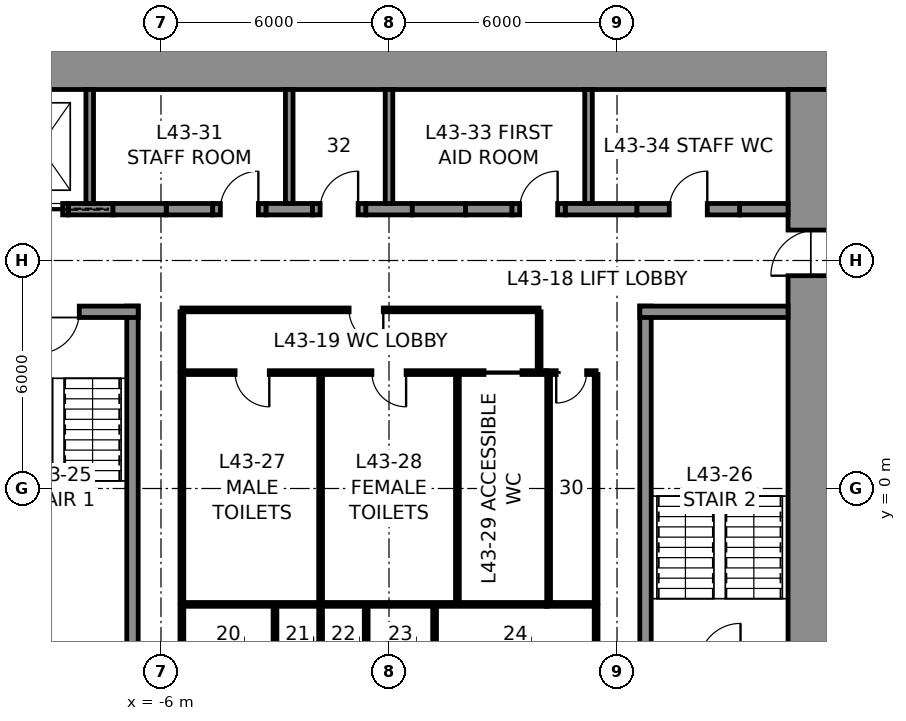
"""IFC4 building model, lengths in metres.
Left out: names, types, materials, properties, quantities, classifications, styles, units other than length and angle.
Written with IfcOpenShell. Run it as: python <this file> out.ifc"""

import sys

from ifc_helpers import new_model, si_unit, direction, frame, frame_2d, origin, place, context, subcontext, project, spatial, rectangle, extrude, element, fill, save


model = new_model("IFC4")
c1 = context("Model", 3, precision=1e-05, world=origin(), true_north=direction((0.0, 1.0)))
c2 = subcontext(c1, "Body", "Model", "MODEL_VIEW")
j1 = project(units=[si_unit("LENGTHUNIT", "METRE"), si_unit("PLANEANGLEUNIT", "RADIAN")], contexts=[c1])
p1 = place(None, origin())
s1 = spatial("IfcSite", under=j1, at=p1, CompositionType="ELEMENT")
p2 = place(p1, origin())
s2 = spatial("IfcBuilding", under=s1, at=p2, CompositionType="ELEMENT")
p3 = place(p2, frame((0.0, 0.0, 201.8)))
s3 = spatial("IfcBuildingStorey", under=s2, at=p3, CompositionType="ELEMENT", Elevation=201.8)
p4 = place(p3, frame((-12.0, 11.25, 0.0), z_axis=(0.0, 0.0, 1.0), x_axis=(1.0, 0.0, 0.0)))
e1 = element("IfcWall", 1, at=p4, inside=s3, PredefinedType="SHEAR", context=c2, shape_type="SweptSolid", body=[
    extrude(rectangle(XDim=24.0, YDim=1.5, at=frame_2d((12.0, 0.0))), origin(), (0.0, 0.0, 1.0), 4.0),
])
p5 = place(p3, frame((11.25, 10.5, 0.0), z_axis=(0.0, 0.0, 1.0), x_axis=(0.0, -1.0, 0.0)))
e2 = element("IfcWall", 2, at=p5, inside=s3, PredefinedType="SHEAR", context=c2, shape_type="SweptSolid", body=[
    extrude(rectangle(XDim=21.0, YDim=1.5, at=frame_2d((10.5, 0.0))), origin(), (0.0, 0.0, 1.0), 4.0),
])
p6 = place(p5, frame((3.7, 0.0, 0.0)))
e3 = element("IfcOpeningElement", 3, at=p6, cuts=e2, PredefinedType="OPENING", context=c2, shape_type="SweptSolid", body=[
    extrude(rectangle(XDim=1.2, YDim=2.3, at=frame_2d((0.6, 1.15))), frame((0.0, 0.76, 0.0), z_axis=(0.0, -1.0, 0.0), x_axis=(1.0, 0.0, 0.0)), (0.0, 0.0, 1.0), 1.52),
])
p7 = place(p5, frame((16.1, 0.0, 0.0)))
e4 = element("IfcOpeningElement", 4, at=p7, cuts=e2, PredefinedType="OPENING", context=c2, shape_type="SweptSolid", body=[
    extrude(rectangle(XDim=1.2, YDim=2.3, at=frame_2d((0.6, 1.15))), frame((0.0, 0.76, 0.0), z_axis=(0.0, -1.0, 0.0), x_axis=(1.0, 0.0, 0.0)), (0.0, 0.0, 1.0), 1.52),
])
p8 = place(p3, frame((-8.438, 7.35, 0.0), z_axis=(0.0, 0.0, 1.0), x_axis=(1.0, 0.0, 0.0)))
e5 = element("IfcWall", 5, at=p8, inside=s3, PredefinedType="SHEAR", context=c2, shape_type="SweptSolid", body=[
    extrude(rectangle(XDim=1.175, YDim=0.3, at=frame_2d((0.587, 0.0))), origin(), (0.0, 0.0, 1.0), 4.0),
])
for number, where, z_axis, x_axis in (
    (6, (-5.863, 7.35, 0.0), (0.0, 0.0, 1.0), (1.0, 0.0, 0.0)),
    (7, (-3.238, 7.35, 0.0), (0.0, 0.0, 1.0), (1.0, 0.0, 0.0)),
    (8, (-0.613, 7.35, 0.0), (0.0, 0.0, 1.0), (1.0, 0.0, 0.0)),
    (9, (2.012, 7.35, 0.0), (0.0, 0.0, 1.0), (1.0, 0.0, 0.0)),
):
    element("IfcWall", number, at=place(p3, frame(where, z_axis=z_axis, x_axis=x_axis)), inside=s3, PredefinedType="SHEAR", context=c2, shape_type="SweptSolid", body=[
        extrude(rectangle(XDim=1.225, YDim=0.3, at=frame_2d((0.613, 0.0))), origin(), (0.0, 0.0, 1.0), 4.0),
    ])
p9 = place(p3, frame((4.637, 7.35, 0.0), z_axis=(0.0, 0.0, 1.0), x_axis=(1.0, 0.0, 0.0)))
e10 = element("IfcWall", 10, at=p9, inside=s3, PredefinedType="SHEAR", context=c2, shape_type="SweptSolid", body=[
    extrude(rectangle(XDim=1.887, YDim=0.3, at=frame_2d((0.944, 0.0))), origin(), (0.0, 0.0, 1.0), 4.0),
])
p10 = place(p3, frame((9.225, 7.35, 0.0), z_axis=(0.0, 0.0, 1.0), x_axis=(1.0, 0.0, 0.0)))
e11 = element("IfcWall", 11, at=p10, inside=s3, PredefinedType="SHEAR", context=c2, shape_type="SweptSolid", body=[
    extrude(rectangle(XDim=1.275, YDim=0.3, at=frame_2d((0.637, 0.0))), origin(), (0.0, 0.0, 1.0), 4.0),
])
p11 = place(p3, frame((-9.938, 7.35, 0.0), z_axis=(0.0, 0.0, 1.0), x_axis=(1.0, 0.0, 0.0)))
e12 = element("IfcWall", 12, at=p11, inside=s3, PredefinedType="PARTITIONING", context=c2, shape_type="SweptSolid", body=[
    extrude(rectangle(XDim=1.5, YDim=0.3, at=frame_2d((0.75, 0.0))), origin(), (0.0, 0.0, 1.0), 4.0),
])
p12 = place(p11, frame((0.15, 0.0, 0.0)))
e13 = element("IfcOpeningElement", 13, at=p12, cuts=e12, PredefinedType="OPENING", context=c2, shape_type="SweptSolid", body=[
    extrude(rectangle(XDim=1.2, YDim=2.3, at=frame_2d((0.6, 1.15))), frame((0.0, 0.16, 0.0), z_axis=(0.0, -1.0, 0.0), x_axis=(1.0, 0.0, 0.0)), (0.0, 0.0, 1.0), 0.32),
])
p13 = place(p3, frame((-7.262, 7.35, 0.0), z_axis=(0.0, 0.0, 1.0), x_axis=(1.0, 0.0, 0.0)))
e14 = element("IfcWall", 14, at=p13, inside=s3, PredefinedType="PARTITIONING", context=c2, shape_type="SweptSolid", body=[
    extrude(rectangle(XDim=1.4, YDim=0.3, at=frame_2d((0.7, 0.0))), origin(), (0.0, 0.0, 1.0), 4.0),
])
p14 = place(p3, frame((-4.637, 7.35, 0.0), z_axis=(0.0, 0.0, 1.0), x_axis=(1.0, 0.0, 0.0)))
e15 = element("IfcWall", 15, at=p14, inside=s3, PredefinedType="PARTITIONING", context=c2, shape_type="SweptSolid", body=[
    extrude(rectangle(XDim=1.4, YDim=0.3, at=frame_2d((0.7, 0.0))), origin(), (0.0, 0.0, 1.0), 4.0),
])
p15 = place(p14, frame((0.2, 0.0, 0.0)))
e16 = element("IfcOpeningElement", 16, at=p15, cuts=e15, PredefinedType="OPENING", context=c2, shape_type="SweptSolid", body=[
    extrude(rectangle(XDim=1.0, YDim=2.3, at=frame_2d((0.5, 1.15))), frame((0.0, 0.16, 0.0), z_axis=(0.0, -1.0, 0.0), x_axis=(1.0, 0.0, 0.0)), (0.0, 0.0, 1.0), 0.32),
])
p16 = place(p3, frame((-2.012, 7.35, 0.0), z_axis=(0.0, 0.0, 1.0), x_axis=(1.0, 0.0, 0.0)))
e17 = element("IfcWall", 17, at=p16, inside=s3, PredefinedType="PARTITIONING", context=c2, shape_type="SweptSolid", body=[
    extrude(rectangle(XDim=1.4, YDim=0.3, at=frame_2d((0.7, 0.0))), origin(), (0.0, 0.0, 1.0), 4.0),
])
p17 = place(p16, frame((0.2, 0.0, 0.0)))
e18 = element("IfcOpeningElement", 18, at=p17, cuts=e17, PredefinedType="OPENING", context=c2, shape_type="SweptSolid", body=[
    extrude(rectangle(XDim=1.0, YDim=2.3, at=frame_2d((0.5, 1.15))), frame((0.0, 0.16, 0.0), z_axis=(0.0, -1.0, 0.0), x_axis=(1.0, 0.0, 0.0)), (0.0, 0.0, 1.0), 0.32),
])
p18 = place(p3, frame((0.613, 7.35, 0.0), z_axis=(0.0, 0.0, 1.0), x_axis=(1.0, 0.0, 0.0)))
e19 = element("IfcWall", 19, at=p18, inside=s3, PredefinedType="PARTITIONING", context=c2, shape_type="SweptSolid", body=[
    extrude(rectangle(XDim=1.4, YDim=0.3, at=frame_2d((0.7, 0.0))), origin(), (0.0, 0.0, 1.0), 4.0),
])
p19 = place(p3, frame((3.238, 7.35, 0.0), z_axis=(0.0, 0.0, 1.0), x_axis=(1.0, 0.0, 0.0)))
e20 = element("IfcWall", 20, at=p19, inside=s3, PredefinedType="PARTITIONING", context=c2, shape_type="SweptSolid", body=[
    extrude(rectangle(XDim=1.4, YDim=0.3, at=frame_2d((0.7, 0.0))), origin(), (0.0, 0.0, 1.0), 4.0),
])
p20 = place(p19, frame((0.2, 0.0, 0.0)))
e21 = element("IfcOpeningElement", 21, at=p20, cuts=e20, PredefinedType="OPENING", context=c2, shape_type="SweptSolid", body=[
    extrude(rectangle(XDim=1.0, YDim=2.3, at=frame_2d((0.5, 1.15))), frame((0.0, 0.16, 0.0), z_axis=(0.0, -1.0, 0.0), x_axis=(1.0, 0.0, 0.0)), (0.0, 0.0, 1.0), 0.32),
])
p21 = place(p3, frame((6.525, 7.35, 0.0), z_axis=(0.0, 0.0, 1.0), x_axis=(1.0, 0.0, 0.0)))
e22 = element("IfcWall", 22, at=p21, inside=s3, PredefinedType="PARTITIONING", context=c2, shape_type="SweptSolid", body=[
    extrude(rectangle(XDim=2.7, YDim=0.3, at=frame_2d((1.35, 0.0))), origin(), (0.0, 0.0, 1.0), 4.0),
])
p22 = place(p21, frame((0.85, 0.0, 0.0)))
e23 = element("IfcOpeningElement", 23, at=p22, cuts=e22, PredefinedType="OPENING", context=c2, shape_type="SweptSolid", body=[
    extrude(rectangle(XDim=1.0, YDim=2.3, at=frame_2d((0.5, 1.15))), frame((0.0, 0.16, 0.0), z_axis=(0.0, -1.0, 0.0), x_axis=(1.0, 0.0, 0.0)), (0.0, 0.0, 1.0), 0.32),
])
for number, where, z_axis, x_axis in (
    (24, (-7.875, 7.5, 0.0), (0.0, 0.0, 1.0), (0.0, 1.0, 0.0)),
    (25, (-2.625, 7.5, 0.0), (0.0, 0.0, 1.0), (0.0, 1.0, 0.0)),
    (26, (0.0, 7.5, 0.0), (0.0, 0.0, 1.0), (0.0, 1.0, 0.0)),
    (27, (5.25, 7.5, 0.0), (0.0, 0.0, 1.0), (0.0, 1.0, 0.0)),
):
    element("IfcWall", number, at=place(p3, frame(where, z_axis=z_axis, x_axis=x_axis)), inside=s3, PredefinedType="PARTITIONING", context=c2, shape_type="SweptSolid", body=[
        extrude(rectangle(XDim=3.0, YDim=0.2, at=frame_2d((1.5, 0.0))), origin(), (0.0, 0.0, 1.0), 4.0),
    ])
p23 = place(p3, frame((-6.75, -4.8, 0.0), z_axis=(0.0, 0.0, 1.0), x_axis=(0.0, 1.0, 0.0)))
e28 = element("IfcWall", 28, at=p23, inside=s3, PredefinedType="SOLIDWALL", context=c2, shape_type="SweptSolid", body=[
    extrude(rectangle(XDim=9.6, YDim=0.3, at=frame_2d((4.8, 0.0))), origin(), (0.0, 0.0, 1.0), 3.75),
])
p24 = place(p3, frame((-10.5, 4.65, 0.0), z_axis=(0.0, 0.0, 1.0), x_axis=(1.0, 0.0, 0.0)))
e29 = element("IfcWall", 29, at=p24, inside=s3, PredefinedType="SOLIDWALL", context=c2, shape_type="SweptSolid", body=[
    extrude(rectangle(XDim=3.9, YDim=0.3, at=frame_2d((1.95, 0.0))), origin(), (0.0, 0.0, 1.0), 3.75),
])
p25 = place(p24, frame((1.25, 0.0, 0.0)))
e30 = element("IfcOpeningElement", 30, at=p25, cuts=e29, PredefinedType="OPENING", context=c2, shape_type="SweptSolid", body=[
    extrude(rectangle(XDim=1.1, YDim=2.3, at=frame_2d((0.55, 1.15))), frame((0.0, 0.16, 0.0), z_axis=(0.0, -1.0, 0.0), x_axis=(1.0, 0.0, 0.0)), (0.0, 0.0, 1.0), 0.32),
])
p26 = place(p3, frame((6.75, -4.8, 0.0), z_axis=(0.0, 0.0, 1.0), x_axis=(0.0, 1.0, 0.0)))
e31 = element("IfcWall", 31, at=p26, inside=s3, PredefinedType="SOLIDWALL", context=c2, shape_type="SweptSolid", body=[
    extrude(rectangle(XDim=9.6, YDim=0.3, at=frame_2d((4.8, 0.0))), origin(), (0.0, 0.0, 1.0), 3.75),
])
p27 = place(p3, frame((6.6, 4.65, 0.0), z_axis=(0.0, 0.0, 1.0), x_axis=(1.0, 0.0, 0.0)))
e32 = element("IfcWall", 32, at=p27, inside=s3, PredefinedType="SOLIDWALL", context=c2, shape_type="SweptSolid", body=[
    extrude(rectangle(XDim=3.9, YDim=0.3, at=frame_2d((1.95, 0.0))), origin(), (0.0, 0.0, 1.0), 3.75),
])
p28 = place(p3, frame((-5.45, 3.05, 0.0), z_axis=(0.0, 0.0, 1.0), x_axis=(1.0, 0.0, 0.0)))
e33 = element("IfcWall", 33, at=p28, inside=s3, PredefinedType="PARTITIONING", context=c2, shape_type="SweptSolid", body=[
    extrude(rectangle(XDim=9.6, YDim=0.1, at=frame_2d((4.8, 0.0))), origin(), (0.0, 0.0, 1.0), 3.75),
])
p29 = place(p28, frame((1.4, 0.0, 0.0)))
e34 = element("IfcOpeningElement", 34, at=p29, cuts=e33, PredefinedType="OPENING", context=c2, shape_type="SweptSolid", body=[
    extrude(rectangle(XDim=0.9, YDim=2.3, at=frame_2d((0.45, 1.15))), frame((0.0, 0.06, 0.0), z_axis=(0.0, -1.0, 0.0), x_axis=(1.0, 0.0, 0.0)), (0.0, 0.0, 1.0), 0.12),
])
p30 = place(p28, frame((5.0, 0.0, 0.0)))
e35 = element("IfcOpeningElement", 35, at=p30, cuts=e33, PredefinedType="OPENING", context=c2, shape_type="SweptSolid", body=[
    extrude(rectangle(XDim=0.9, YDim=2.3, at=frame_2d((0.45, 1.15))), frame((0.0, 0.06, 0.0), z_axis=(0.0, -1.0, 0.0), x_axis=(1.0, 0.0, 0.0)), (0.0, 0.0, 1.0), 0.12),
])
p31 = place(p28, frame((7.95, 0.0, 0.0)))
e36 = element("IfcOpeningElement", 36, at=p31, cuts=e33, PredefinedType="OPENING", context=c2, shape_type="SweptSolid", body=[
    extrude(rectangle(XDim=1.0, YDim=2.3, at=frame_2d((0.5, 1.15))), frame((0.0, 0.06, 0.0), z_axis=(0.0, -1.0, 0.0), x_axis=(1.0, 0.0, 0.0)), (0.0, 0.0, 1.0), 0.12),
])
p32 = place(p3, frame((4.15, 3.05, 0.0), z_axis=(0.0, 0.0, 1.0), x_axis=(1.0, 0.0, 0.0)))
e37 = element("IfcWall", 37, at=p32, inside=s3, PredefinedType="PARTITIONING", context=c2, shape_type="SweptSolid", body=[
    extrude(rectangle(XDim=1.3, YDim=0.1, at=frame_2d((0.65, 0.0))), origin(), (0.0, 0.0, 1.0), 3.75),
])
p33 = place(p32, frame((0.25, 0.0, 0.0)))
e38 = element("IfcOpeningElement", 38, at=p33, cuts=e37, PredefinedType="OPENING", context=c2, shape_type="SweptSolid", body=[
    extrude(rectangle(XDim=0.8, YDim=2.3, at=frame_2d((0.4, 1.15))), frame((0.0, 0.06, 0.0), z_axis=(0.0, -1.0, 0.0), x_axis=(1.0, 0.0, 0.0)), (0.0, 0.0, 1.0), 0.12),
])
p34 = place(p3, frame((4.15, -3.05, 0.0), z_axis=(0.0, 0.0, 1.0), x_axis=(-1.0, 0.0, 0.0)))
e39 = element("IfcWall", 39, at=p34, inside=s3, PredefinedType="PARTITIONING", context=c2, shape_type="SweptSolid", body=[
    extrude(rectangle(XDim=9.6, YDim=0.1, at=frame_2d((4.8, 0.0))), origin(), (0.0, 0.0, 1.0), 3.75),
])
p35 = place(p3, frame((5.45, -3.05, 0.0), z_axis=(0.0, 0.0, 1.0), x_axis=(-1.0, 0.0, 0.0)))
e40 = element("IfcWall", 40, at=p35, inside=s3, PredefinedType="PARTITIONING", context=c2, shape_type="SweptSolid", body=[
    extrude(rectangle(XDim=1.3, YDim=0.1, at=frame_2d((0.65, 0.0))), origin(), (0.0, 0.0, 1.0), 3.75),
])
for number, where, z_axis, x_axis in (
    (41, (5.45, 3.0, 0.0), (0.0, 0.0, 1.0), (0.0, -1.0, 0.0)),
    (42, (-5.45, -3.0, 0.0), (0.0, 0.0, 1.0), (0.0, 1.0, 0.0)),
    (43, (-1.8, -3.0, 0.0), (0.0, 0.0, 1.0), (0.0, 1.0, 0.0)),
    (44, (1.8, -3.0, 0.0), (0.0, 0.0, 1.0), (0.0, 1.0, 0.0)),
    (45, (4.2, -3.0, 0.0), (0.0, 0.0, 1.0), (0.0, 1.0, 0.0)),
):
    element("IfcWall", number, at=place(p3, frame(where, z_axis=z_axis, x_axis=x_axis)), inside=s3, PredefinedType="PARTITIONING", context=c2, shape_type="SweptSolid", body=[
        extrude(rectangle(XDim=6.0, YDim=0.1, at=frame_2d((3.0, 0.0))), origin(), (0.0, 0.0, 1.0), 3.75),
    ])
p36 = place(p3, frame((-5.45, 4.7, 0.0), z_axis=(0.0, 0.0, 1.0), x_axis=(1.0, 0.0, 0.0)))
e46 = element("IfcWall", 46, at=p36, inside=s3, PredefinedType="PARTITIONING", context=c2, shape_type="SweptSolid", body=[
    extrude(rectangle(XDim=9.4, YDim=0.1, at=frame_2d((4.7, 0.0))), origin(), (0.0, 0.0, 1.0), 3.75),
])
p37 = place(p36, frame((4.4, 0.0, 0.0)))
e47 = element("IfcOpeningElement", 47, at=p37, cuts=e46, PredefinedType="OPENING", context=c2, shape_type="SweptSolid", body=[
    extrude(rectangle(XDim=0.9, YDim=2.3, at=frame_2d((0.45, 1.15))), frame((0.0, 0.06, 0.0), z_axis=(0.0, -1.0, 0.0), x_axis=(1.0, 0.0, 0.0)), (0.0, 0.0, 1.0), 0.12),
])
for number, where, z_axis, x_axis in (
    (48, (-5.45, 3.1, 0.0), (0.0, 0.0, 1.0), (0.0, 1.0, 0.0)),
    (49, (3.95, 3.1, 0.0), (0.0, 0.0, 1.0), (0.0, 1.0, 0.0)),
    (50, (-5.45, -3.1, 0.0), (0.0, 0.0, 1.0), (0.0, -1.0, 0.0)),
    (51, (5.45, -3.1, 0.0), (0.0, 0.0, 1.0), (0.0, -1.0, 0.0)),
    (52, (-3.0, -3.1, 0.0), (0.0, 0.0, 1.0), (0.0, -1.0, 0.0)),
    (53, (-1.8, -3.1, 0.0), (0.0, 0.0, 1.0), (0.0, -1.0, 0.0)),
    (54, (-0.6, -3.1, 0.0), (0.0, 0.0, 1.0), (0.0, -1.0, 0.0)),
    (55, (1.2, -3.1, 0.0), (0.0, 0.0, 1.0), (0.0, -1.0, 0.0)),
):
    element("IfcWall", number, at=place(p3, frame(where, z_axis=z_axis, x_axis=x_axis)), inside=s3, PredefinedType="PARTITIONING", context=c2, shape_type="SweptSolid", body=[
        extrude(rectangle(XDim=1.55, YDim=0.1, at=frame_2d((0.775, 0.0))), origin(), (0.0, 0.0, 1.0), 3.75),
    ])
p38 = place(p25, frame((1.1, 0.0, 0.0), z_axis=(0.0, 0.0, 1.0), x_axis=(-1.0, 0.0, 0.0)))
e56 = element("IfcDoor", 56, at=p38, inside=s3, OperationType="SINGLE_SWING_RIGHT", PredefinedType="DOOR", context=c2, shape_type="SweptSolid", body=[
    extrude(rectangle(XDim=1.1, YDim=2.3, at=frame_2d((0.55, 1.15))), frame((0.0, 0.025, 0.0), z_axis=(0.0, -1.0, 0.0), x_axis=(1.0, 0.0, 0.0)), (0.0, 0.0, 1.0), 0.05),
])
fill(e30, e56)
p39 = place(p29, frame((0.9, 0.0, 0.0), z_axis=(0.0, 0.0, 1.0), x_axis=(-1.0, 0.0, 0.0)))
e57 = element("IfcDoor", 57, at=p39, inside=s3, OperationType="SINGLE_SWING_LEFT", PredefinedType="DOOR", context=c2, shape_type="SweptSolid", body=[
    extrude(rectangle(XDim=0.9, YDim=2.3, at=frame_2d((0.45, 1.15))), frame((0.0, 0.025, 0.0), z_axis=(0.0, -1.0, 0.0), x_axis=(1.0, 0.0, 0.0)), (0.0, 0.0, 1.0), 0.05),
])
fill(e34, e57)
p40 = place(p30, frame((0.9, 0.0, 0.0), z_axis=(0.0, 0.0, 1.0), x_axis=(-1.0, 0.0, 0.0)))
e58 = element("IfcDoor", 58, at=p40, inside=s3, OperationType="SINGLE_SWING_LEFT", PredefinedType="DOOR", context=c2, shape_type="SweptSolid", body=[
    extrude(rectangle(XDim=0.9, YDim=2.3, at=frame_2d((0.45, 1.15))), frame((0.0, 0.025, 0.0), z_axis=(0.0, -1.0, 0.0), x_axis=(1.0, 0.0, 0.0)), (0.0, 0.0, 1.0), 0.05),
])
fill(e35, e58)
p41 = place(p31, frame((1.0, 0.0, 0.0), z_axis=(0.0, 0.0, 1.0), x_axis=(-1.0, 0.0, 0.0)))
e59 = element("IfcDoor", 59, at=p41, inside=s3, OperationType="SLIDING_TO_LEFT", PredefinedType="DOOR", context=c2, shape_type="SweptSolid", body=[
    extrude(rectangle(XDim=1.0, YDim=2.3, at=frame_2d((0.5, 1.15))), frame((0.0, 0.025, 0.0), z_axis=(0.0, -1.0, 0.0), x_axis=(1.0, 0.0, 0.0)), (0.0, 0.0, 1.0), 0.05),
])
fill(e36, e59)
p42 = place(p33, frame((0.8, 0.0, 0.0), z_axis=(0.0, 0.0, 1.0), x_axis=(-1.0, 0.0, 0.0)))
e60 = element("IfcDoor", 60, at=p42, inside=s3, OperationType="SINGLE_SWING_RIGHT", PredefinedType="DOOR", context=c2, shape_type="SweptSolid", body=[
    extrude(rectangle(XDim=0.8, YDim=2.3, at=frame_2d((0.4, 1.15))), frame((0.0, 0.025, 0.0), z_axis=(0.0, -1.0, 0.0), x_axis=(1.0, 0.0, 0.0)), (0.0, 0.0, 1.0), 0.05),
])
fill(e38, e60)
p43 = place(p37, frame((0.9, 0.0, 0.0), z_axis=(0.0, 0.0, 1.0), x_axis=(-1.0, 0.0, 0.0)))
e61 = element("IfcDoor", 61, at=p43, inside=s3, OperationType="SINGLE_SWING_LEFT", PredefinedType="DOOR", context=c2, shape_type="SweptSolid", body=[
    extrude(rectangle(XDim=0.9, YDim=2.3, at=frame_2d((0.45, 1.15))), frame((0.0, 0.025, 0.0), z_axis=(0.0, -1.0, 0.0), x_axis=(1.0, 0.0, 0.0)), (0.0, 0.0, 1.0), 0.05),
])
fill(e47, e61)
p44 = place(p15, origin())
e62 = element("IfcDoor", 62, at=p44, inside=s3, OperationType="SINGLE_SWING_RIGHT", PredefinedType="DOOR", context=c2, shape_type="SweptSolid", body=[
    extrude(rectangle(XDim=1.0, YDim=2.3, at=frame_2d((0.5, 1.15))), frame((0.0, 0.025, 0.0), z_axis=(0.0, -1.0, 0.0), x_axis=(1.0, 0.0, 0.0)), (0.0, 0.0, 1.0), 0.05),
])
fill(e16, e62)
p45 = place(p17, origin())
e63 = element("IfcDoor", 63, at=p45, inside=s3, OperationType="SINGLE_SWING_RIGHT", PredefinedType="DOOR", context=c2, shape_type="SweptSolid", body=[
    extrude(rectangle(XDim=1.0, YDim=2.3, at=frame_2d((0.5, 1.15))), frame((0.0, 0.025, 0.0), z_axis=(0.0, -1.0, 0.0), x_axis=(1.0, 0.0, 0.0)), (0.0, 0.0, 1.0), 0.05),
])
fill(e18, e63)
p46 = place(p20, origin())
e64 = element("IfcDoor", 64, at=p46, inside=s3, OperationType="SINGLE_SWING_RIGHT", PredefinedType="DOOR", context=c2, shape_type="SweptSolid", body=[
    extrude(rectangle(XDim=1.0, YDim=2.3, at=frame_2d((0.5, 1.15))), frame((0.0, 0.025, 0.0), z_axis=(0.0, -1.0, 0.0), x_axis=(1.0, 0.0, 0.0)), (0.0, 0.0, 1.0), 0.05),
])
fill(e21, e64)
p47 = place(p22, origin())
e65 = element("IfcDoor", 65, at=p47, inside=s3, OperationType="SINGLE_SWING_RIGHT", PredefinedType="DOOR", context=c2, shape_type="SweptSolid", body=[
    extrude(rectangle(XDim=1.0, YDim=2.3, at=frame_2d((0.5, 1.15))), frame((0.0, 0.025, 0.0), z_axis=(0.0, -1.0, 0.0), x_axis=(1.0, 0.0, 0.0)), (0.0, 0.0, 1.0), 0.05),
])
fill(e23, e65)
p48 = place(p6, frame((1.2, 0.0, 0.0), z_axis=(0.0, 0.0, 1.0), x_axis=(-1.0, 0.0, 0.0)))
e66 = element("IfcDoor", 66, at=p48, inside=s3, OperationType="SINGLE_SWING_LEFT", PredefinedType="DOOR", context=c2, shape_type="SweptSolid", body=[
    extrude(rectangle(XDim=1.2, YDim=2.3, at=frame_2d((0.6, 1.15))), frame((0.0, 0.025, 0.0), z_axis=(0.0, -1.0, 0.0), x_axis=(1.0, 0.0, 0.0)), (0.0, 0.0, 1.0), 0.05),
])
fill(e3, e66)
p49 = place(p12, frame((1.2, 0.0, 0.0), z_axis=(0.0, 0.0, 1.0), x_axis=(-1.0, 0.0, 0.0)))
e67 = element("IfcDoor", 67, at=p49, inside=s3, OperationType="SLIDING_TO_LEFT", PredefinedType="DOOR", context=c2, shape_type="SweptSolid", body=[
    extrude(rectangle(XDim=1.2, YDim=2.3, at=frame_2d((0.6, 1.15))), frame((0.0, 0.025, 0.0), z_axis=(0.0, -1.0, 0.0), x_axis=(1.0, 0.0, 0.0)), (0.0, 0.0, 1.0), 0.05),
])
fill(e13, e67)
save(model, sys.argv[1])
